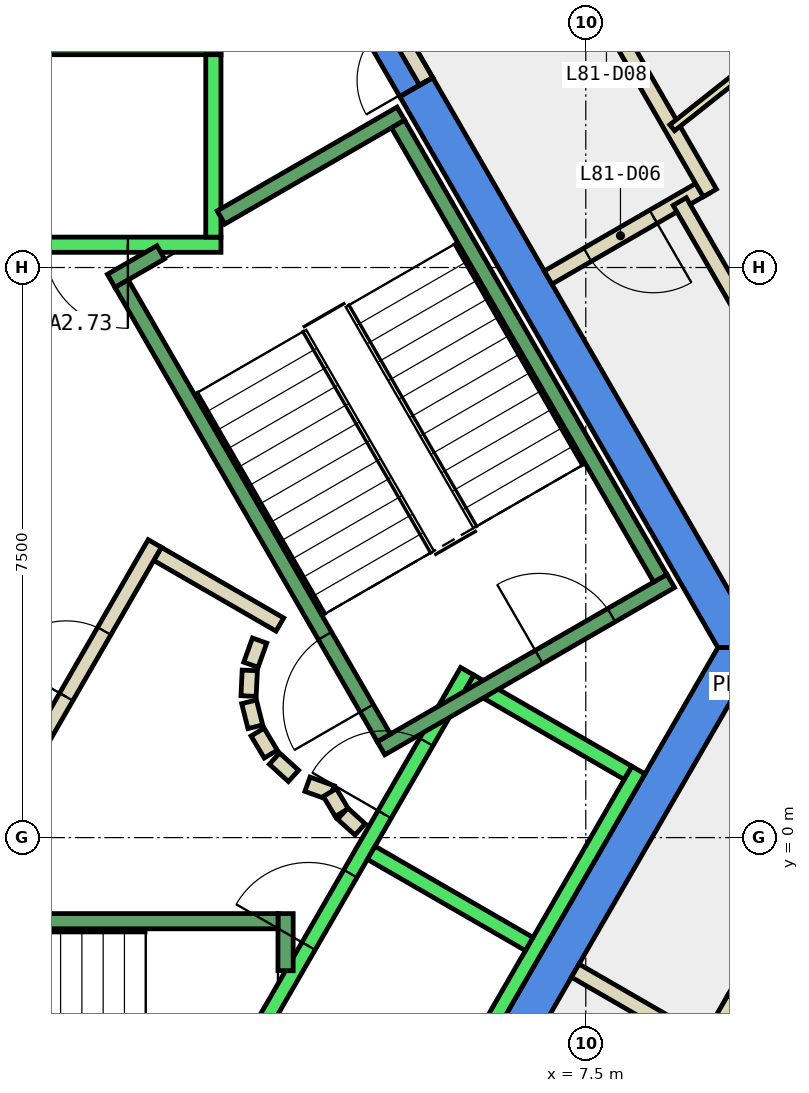
"""IFC4 building model, lengths in metres.
Left out: names, types, materials, properties, quantities, classifications, styles, units other than length and angle.
Written with IfcOpenShell. Run it as: python <this file> out.ifc"""

import sys

from ifc_helpers import new_model, si_unit, direction, frame, frame_2d, origin, place, context, subcontext, project, spatial, polyline, rectangle, outline, extrude, element, fill, save


model = new_model("IFC4")
c1 = context("Model", 3, precision=1e-05, world=origin(), true_north=direction((0.0, 1.0)))
c2 = subcontext(c1, "Body", "Model", "MODEL_VIEW")
j1 = project(units=[si_unit("LENGTHUNIT", "METRE"), si_unit("PLANEANGLEUNIT", "RADIAN")], contexts=[c1])
p1 = place(None, origin())
s1 = spatial("IfcSite", under=j1, at=p1, CompositionType="ELEMENT")
p2 = place(p1, origin())
s2 = spatial("IfcBuilding", under=s1, at=p2, CompositionType="ELEMENT")
p3 = place(p2, frame((0.0, 0.0, 344.9)))
s3 = spatial("IfcBuildingStorey", under=s2, at=p3, CompositionType="ELEMENT", Elevation=344.9)
p4 = place(p3, frame((0.0, 0.0, -0.35)))
e1 = element("IfcWall", 1, at=p4, inside=s3, PredefinedType="SHEAR", context=c2, shape_type="SweptSolid", body=[
    extrude(outline(polyline([(5.486, 9.998), (5.053, 9.748), (9.238, 2.5), (9.815, 2.5), (5.486, 9.998)])), origin(), (0.0, 0.0, 1.0), 4.4),
])
p5 = place(p3, frame((0.0, 0.0, 3.6)))
e2 = element("IfcWall", 2, at=p5, inside=s3, PredefinedType="SHEAR", context=c2, shape_type="SweptSolid", body=[
    extrude(outline(polyline([(5.022, 10.8), (4.677, 10.601), (4.619, 10.5), (5.053, 9.748), (5.486, 9.998), (5.022, 10.8)])), origin(), (0.0, 0.0, 1.0), 0.45),
])
p6 = place(p3, frame((0.0, 0.0, -0.35)))
e3 = element("IfcWall", 3, at=p6, inside=s3, PredefinedType="SHEAR", context=c2, shape_type="SweptSolid", body=[
    extrude(outline(polyline([(4.907, -6.0), (9.815, 2.5), (9.238, 2.5), (4.619, -5.5), (4.907, -6.0)])), origin(), (0.0, 0.0, 1.0), 4.4),
])
p7 = place(p3, frame((12.605, 7.854, 0.0), z_axis=(0.0, 0.0, 1.0), x_axis=(-0.510686403068, 0.859767060152, 0.0)))
e4 = element("IfcWall", 4, at=p7, inside=s3, PredefinedType="STANDARD", context=c2, shape_type="SweptSolid", body=[
    extrude(rectangle(XDim=6.38, YDim=0.3, at=frame_2d((3.19, 0.0))), origin(), (0.0, 0.0, 1.0), 4.05),
])
p8 = place(p7, frame((0.595, 0.0, 0.9)))
e5 = element("IfcOpeningElement", 5, at=p8, cuts=e4, PredefinedType="OPENING", context=c2, shape_type="SweptSolid", body=[
    extrude(rectangle(XDim=2.0, YDim=3.0, at=frame_2d((1.0, 1.5))), frame((0.0, 0.16, 0.0), z_axis=(0.0, -1.0, 0.0), x_axis=(1.0, 0.0, 0.0)), (0.0, 0.0, 1.0), 0.32),
])
p9 = place(p7, frame((3.785, 0.0, 0.9)))
e6 = element("IfcOpeningElement", 6, at=p9, cuts=e4, PredefinedType="OPENING", context=c2, shape_type="SweptSolid", body=[
    extrude(rectangle(XDim=2.0, YDim=3.0, at=frame_2d((1.0, 1.5))), frame((0.0, 0.16, 0.0), z_axis=(0.0, -1.0, 0.0), x_axis=(1.0, 0.0, 0.0)), (0.0, 0.0, 1.0), 0.32),
])
p10 = place(p3, frame((1.866, 3.732, 0.0), z_axis=(0.0, 0.0, 1.0), x_axis=(0.866043361281, -0.499968895414, 0.0)))
e7 = element("IfcWall", 7, at=p10, inside=s3, PredefinedType="PARTITIONING", context=c2, shape_type="SweptSolid", body=[
    extrude(rectangle(XDim=1.858, YDim=0.2, at=frame_2d((0.929, 0.0))), origin(), (0.0, 0.0, 1.0), 4.05),
])
p11 = place(p3, frame((3.208, 2.592, 0.0), z_axis=(0.0, 0.0, 1.0), x_axis=(-0.337388820924, -0.941365382578, 0.0)))
e8 = element("IfcWall", 8, at=p11, inside=s3, PredefinedType="PARTITIONING", context=c2, shape_type="SweptSolid", body=[
    extrude(rectangle(XDim=0.338, YDim=0.2, at=frame_2d((0.169, 0.0))), origin(), (0.0, 0.0, 1.0), 4.05),
])
p12 = place(p3, frame((3.079, 2.199, 0.0), z_axis=(0.0, 0.0, 1.0), x_axis=(-0.047771483479, -0.998858290933, 0.0)))
e9 = element("IfcWall", 9, at=p12, inside=s3, PredefinedType="PARTITIONING", context=c2, shape_type="SweptSolid", body=[
    extrude(rectangle(XDim=0.337, YDim=0.2, at=frame_2d((0.169, 0.0))), origin(), (0.0, 0.0, 1.0), 4.05),
])
p13 = place(p3, frame((3.07, 1.786, 0.0), z_axis=(0.0, 0.0, 1.0), x_axis=(0.242705583207, -0.970099994784, 0.0)))
e10 = element("IfcWall", 10, at=p13, inside=s3, PredefinedType="PARTITIONING", context=c2, shape_type="SweptSolid", body=[
    extrude(rectangle(XDim=0.338, YDim=0.2, at=frame_2d((0.169, 0.0))), origin(), (0.0, 0.0, 1.0), 4.05),
])
for number, where, z_axis, x_axis in (
    (11, (3.182, 1.388, 0.0), (0.0, 0.0, 1.0), (0.512, -0.859, 0.0)),
    (12, (3.404, 1.039, 0.0), (0.0, 0.0, 1.0), (0.74, -0.672, 0.0)),
):
    element("IfcWall", number, at=place(p3, frame(where, z_axis=z_axis, x_axis=x_axis)), inside=s3, PredefinedType="PARTITIONING", context=c2, shape_type="SweptSolid", body=[
        extrude(rectangle(XDim=0.338, YDim=0.2, at=frame_2d((0.169, 0.0))), origin(), (0.0, 0.0, 1.0), 4.05),
    ])
p14 = place(p3, frame((3.838, 0.702, 0.0), z_axis=(0.0, 0.0, 1.0), x_axis=(0.941035081519, -0.338308993895, 0.0)))
e13 = element("IfcWall", 13, at=p14, inside=s3, PredefinedType="PARTITIONING", context=c2, shape_type="SweptSolid", body=[
    extrude(rectangle(XDim=0.337, YDim=0.2, at=frame_2d((0.168, 0.0))), origin(), (0.0, 0.0, 1.0), 4.05),
])
p15 = place(p3, frame((4.132, 0.593, 0.0), z_axis=(0.0, 0.0, 1.0), x_axis=(0.513561617048, -0.858052717201, 0.0)))
e14 = element("IfcWall", 14, at=p15, inside=s3, PredefinedType="PARTITIONING", context=c2, shape_type="SweptSolid", body=[
    extrude(rectangle(XDim=0.308, YDim=0.2, at=frame_2d((0.154, 0.0))), origin(), (0.0, 0.0, 1.0), 4.05),
])
p16 = place(p3, frame((4.301, 0.315, 0.0), z_axis=(0.0, 0.0, 1.0), x_axis=(0.741798017506, -0.670623367639, 0.0)))
e15 = element("IfcWall", 15, at=p16, inside=s3, PredefinedType="PARTITIONING", context=c2, shape_type="SweptSolid", body=[
    extrude(rectangle(XDim=0.309, YDim=0.2, at=frame_2d((0.154, 0.0))), origin(), (0.0, 0.0, 1.0), 4.05),
])
p17 = place(p3, frame((0.05, 0.787, 0.0), z_axis=(0.0, 0.0, 1.0), x_axis=(0.499954076797, 0.866051915934, 0.0)))
e16 = element("IfcWall", 16, at=p17, inside=s3, PredefinedType="PARTITIONING", context=c2, shape_type="SweptSolid", body=[
    extrude(rectangle(XDim=3.558, YDim=0.2, at=frame_2d((1.779, 0.0))), origin(), (0.0, 0.0, 1.0), 4.05),
])
p18 = place(p17, frame((1.229, 0.0, 0.0)))
e17 = element("IfcOpeningElement", 17, at=p18, cuts=e16, PredefinedType="OPENING", context=c2, shape_type="SweptSolid", body=[
    extrude(rectangle(XDim=1.0, YDim=2.1, at=frame_2d((0.5, 1.05))), frame((0.0, 0.11, 0.0), z_axis=(0.0, -1.0, 0.0), x_axis=(1.0, 0.0, 0.0)), (0.0, 0.0, 1.0), 0.22),
])
p19 = place(p3, frame((7.361, -1.75, 0.0), z_axis=(0.0, 0.0, 1.0), x_axis=(0.865980106173, -0.500078449558, 0.0)))
e18 = element("IfcWall", 18, at=p19, inside=s3, PredefinedType="PARTITIONING", context=c2, shape_type="SweptSolid", body=[
    extrude(rectangle(XDim=1.9, YDim=0.2, at=frame_2d((0.95, 0.0))), origin(), (0.0, 0.0, 1.0), 4.05),
])
p20 = place(p3, frame((9.082, 8.568, 0.0), z_axis=(0.0, 0.0, 1.0), x_axis=(-0.865955154139, -0.50012165622, 0.0)))
e19 = element("IfcWall", 19, at=p20, inside=s3, PredefinedType="PARTITIONING", context=c2, shape_type="SweptSolid", body=[
    extrude(rectangle(XDim=2.4, YDim=0.2, at=frame_2d((1.2, 0.0))), origin(), (0.0, 0.0, 1.0), 4.05),
])
p21 = place(p20, frame((0.8, 0.0, 0.0)))
e20 = element("IfcOpeningElement", 20, at=p21, cuts=e19, PredefinedType="OPENING", context=c2, shape_type="SweptSolid", body=[
    extrude(rectangle(XDim=1.0, YDim=2.1, at=frame_2d((0.5, 1.05))), frame((0.0, 0.11, 0.0), z_axis=(0.0, -1.0, 0.0), x_axis=(1.0, 0.0, 0.0)), (0.0, 0.0, 1.0), 0.22),
])
p22 = place(p3, frame((8.736, 8.368, 0.0), z_axis=(0.0, 0.0, 1.0), x_axis=(0.500041339179, -0.866001535283, 0.0)))
e21 = element("IfcWall", 21, at=p22, inside=s3, PredefinedType="PARTITIONING", context=c2, shape_type="SweptSolid", body=[
    extrude(rectangle(XDim=2.342, YDim=0.2, at=frame_2d((1.171, 0.0))), origin(), (0.0, 0.0, 1.0), 4.05),
])
p23 = place(p3, frame((5.399, 9.948, 0.0), z_axis=(0.0, 0.0, 1.0), x_axis=(-0.499882215713, 0.866093395895, 0.0)))
e22 = element("IfcWall", 22, at=p23, inside=s3, PredefinedType="PARTITIONING", context=c2, shape_type="SweptSolid", body=[
    extrude(rectangle(XDim=0.926, YDim=0.2, at=frame_2d((0.463, 0.0))), origin(), (0.0, 0.0, 1.0), 2.4),
])
p24 = place(p23, frame((0.017, 0.0, 0.0)))
e23 = element("IfcOpeningElement", 23, at=p24, cuts=e22, PredefinedType="OPENING", context=c2, shape_type="SweptSolid", body=[
    extrude(rectangle(XDim=0.9, YDim=2.1, at=frame_2d((0.45, 1.05))), frame((0.0, 0.11, 0.0), z_axis=(0.0, -1.0, 0.0), x_axis=(1.0, 0.0, 0.0)), (0.0, 0.0, 1.0), 0.22),
])
p25 = place(p3, frame((7.482, 11.339, 0.0), z_axis=(0.0, 0.0, 1.0), x_axis=(0.49999780286, -0.8660266723, 0.0)))
e24 = element("IfcWall", 24, at=p25, inside=s3, PredefinedType="PARTITIONING", context=c2, shape_type="SweptSolid", body=[
    extrude(rectangle(XDim=3.3, YDim=0.2, at=frame_2d((1.65, 0.0))), origin(), (0.0, 0.0, 1.0), 4.05),
])
p26 = place(p25, frame((0.08, 0.0, 0.0)))
e25 = element("IfcOpeningElement", 25, at=p26, cuts=e24, PredefinedType="OPENING", context=c2, shape_type="SweptSolid", body=[
    extrude(rectangle(XDim=1.0, YDim=2.1, at=frame_2d((0.5, 1.05))), frame((0.0, 0.11, 0.0), z_axis=(0.0, -1.0, 0.0), x_axis=(1.0, 0.0, 0.0)), (0.0, 0.0, 1.0), 0.22),
])
p27 = place(p3, frame((9.815, -1.499, 0.0), z_axis=(0.0, 0.0, 1.0), x_axis=(-0.499508606083, -0.866308924373, 0.0)))
e26 = element("IfcWall", 26, at=p27, inside=s3, PredefinedType="PARTITIONING", context=c2, shape_type="SweptSolid", body=[
    extrude(rectangle(XDim=0.725, YDim=0.2, at=frame_2d((0.362, 0.0))), origin(), (0.0, 0.0, 1.0), 1.95),
])
p28 = place(p3, frame((9.453, -2.127, 0.0), z_axis=(0.0, 0.0, 1.0), x_axis=(-0.499884866553, -0.866091865907, 0.0)))
e27 = element("IfcWall", 27, at=p28, inside=s3, PredefinedType="PARTITIONING", context=c2, shape_type="SweptSolid", body=[
    extrude(rectangle(XDim=0.694, YDim=0.2, at=frame_2d((0.347, 0.0))), origin(), (0.0, 0.0, 1.0), 4.05),
])
p29 = place(p3, frame((9.821, 10.276, 0.0), z_axis=(0.0, 0.0, 1.0), x_axis=(-0.784249073328, -0.620446122548, 0.0)))
e28 = element("IfcWall", 28, at=p29, inside=s3, PredefinedType="PARTITIONING", context=c2, shape_type="SweptSolid", body=[
    extrude(rectangle(XDim=1.51, YDim=0.1, at=frame_2d((0.755, 0.0))), origin(), (0.0, 0.0, 1.0), 4.05),
])
p30 = place(p3, frame((2.7, 7.8, 0.0), z_axis=(0.0, 0.0, 1.0), x_axis=(-1.0, 0.0, 0.0)))
e29 = element("IfcWall", 29, at=p30, inside=s3, PredefinedType="STANDARD", context=c2, shape_type="SweptSolid", body=[
    extrude(rectangle(XDim=5.4, YDim=0.2, at=frame_2d((2.7, 0.0))), origin(), (0.0, 0.0, 1.0), 4.05),
])
p31 = place(p30, frame((1.225, 0.0, 0.0)))
e30 = element("IfcOpeningElement", 30, at=p31, cuts=e29, PredefinedType="OPENING", context=c2, shape_type="SweptSolid", body=[
    extrude(rectangle(XDim=1.1, YDim=2.1, at=frame_2d((0.55, 1.05))), frame((0.0, 0.11, 0.0), z_axis=(0.0, -1.0, 0.0), x_axis=(1.0, 0.0, 0.0)), (0.0, 0.0, 1.0), 0.22),
])
p32 = place(p30, frame((3.075, 0.0, 0.0)))
e31 = element("IfcOpeningElement", 31, at=p32, cuts=e29, PredefinedType="OPENING", context=c2, shape_type="SweptSolid", body=[
    extrude(rectangle(XDim=1.1, YDim=2.1, at=frame_2d((0.55, 1.05))), frame((0.0, 0.11, 0.0), z_axis=(0.0, -1.0, 0.0), x_axis=(1.0, 0.0, 0.0)), (0.0, 0.0, 1.0), 0.22),
])
p33 = place(p3, frame((2.7, 10.4, 0.0), z_axis=(0.0, 0.0, 1.0), x_axis=(-1.0, 0.0, 0.0)))
e32 = element("IfcWall", 32, at=p33, inside=s3, PredefinedType="STANDARD", context=c2, shape_type="SweptSolid", body=[
    extrude(rectangle(XDim=5.4, YDim=0.2, at=frame_2d((2.7, 0.0))), origin(), (0.0, 0.0, 1.0), 4.05),
])
p34 = place(p3, frame((2.6, 7.9, 0.0), z_axis=(0.0, 0.0, 1.0), x_axis=(0.0, 1.0, 0.0)))
e33 = element("IfcWall", 33, at=p34, inside=s3, PredefinedType="STANDARD", context=c2, shape_type="SweptSolid", body=[
    extrude(rectangle(XDim=2.4, YDim=0.2, at=frame_2d((1.2, 0.0))), origin(), (0.0, 0.0, 1.0), 4.05),
])
p35 = place(p3, frame((3.24, -2.488, 0.0), z_axis=(0.0, 0.0, 1.0), x_axis=(0.500034260056, 0.866005622828, 0.0)))
e34 = element("IfcWall", 34, at=p35, inside=s3, PredefinedType="STANDARD", context=c2, shape_type="SweptSolid", body=[
    extrude(rectangle(XDim=5.399, YDim=0.2, at=frame_2d((2.7, 0.0))), origin(), (0.0, 0.0, 1.0), 4.05),
])
p36 = place(p35, frame((3.225, 0.0, 0.0)))
e35 = element("IfcOpeningElement", 35, at=p36, cuts=e34, PredefinedType="OPENING", context=c2, shape_type="SweptSolid", body=[
    extrude(rectangle(XDim=1.1, YDim=2.1, at=frame_2d((0.55, 1.05))), frame((0.0, 0.11, 0.0), z_axis=(0.0, -1.0, 0.0), x_axis=(1.0, 0.0, 0.0)), (0.0, 0.0, 1.0), 0.22),
])
p37 = place(p35, frame((1.225, 0.0, 0.0)))
e36 = element("IfcOpeningElement", 36, at=p37, cuts=e34, PredefinedType="OPENING", context=c2, shape_type="SweptSolid", body=[
    extrude(rectangle(XDim=1.1, YDim=2.1, at=frame_2d((0.55, 1.05))), frame((0.0, 0.11, 0.0), z_axis=(0.0, -1.0, 0.0), x_axis=(1.0, 0.0, 0.0)), (0.0, 0.0, 1.0), 0.22),
])
p38 = place(p3, frame((5.492, -3.788, 0.0), z_axis=(0.0, 0.0, 1.0), x_axis=(0.500034260056, 0.866005622828, 0.0)))
e37 = element("IfcWall", 37, at=p38, inside=s3, PredefinedType="STANDARD", context=c2, shape_type="SweptSolid", body=[
    extrude(rectangle(XDim=5.399, YDim=0.2, at=frame_2d((2.7, 0.0))), origin(), (0.0, 0.0, 1.0), 4.05),
])
for number, where, z_axis, x_axis in (
    (38, (4.677, -0.2, 0.0), (0.0, 0.0, 1.0), (0.866, -0.5, 0.0)),
    (39, (5.977, 2.052, 0.0), (0.0, 0.0, 1.0), (0.866, -0.5, 0.0)),
):
    element("IfcWall", number, at=place(p3, frame(where, z_axis=z_axis, x_axis=x_axis)), inside=s3, PredefinedType="STANDARD", context=c2, shape_type="SweptSolid", body=[
        extrude(rectangle(XDim=2.399, YDim=0.2, at=frame_2d((1.2, 0.0))), origin(), (0.0, 0.0, 1.0), 4.05),
    ])
p39 = place(p3, frame((3.55, -1.0, 0.0), z_axis=(0.0, 0.0, 1.0), x_axis=(0.0, -1.0, 0.0)))
e40 = element("IfcWall", 40, at=p39, inside=s3, PredefinedType="STANDARD", context=c2, shape_type="SweptSolid", body=[
    extrude(rectangle(XDim=0.751, YDim=0.2, at=frame_2d((0.375, 0.0))), origin(), (0.0, 0.0, 1.0), 4.05),
])
p40 = place(p3, frame((-3.45, -1.1, 0.0), z_axis=(0.0, 0.0, 1.0), x_axis=(1.0, 0.0, 0.0)))
e41 = element("IfcWall", 41, at=p40, inside=s3, PredefinedType="STANDARD", context=c2, shape_type="SweptSolid", body=[
    extrude(rectangle(XDim=6.9, YDim=0.2, at=frame_2d((3.45, 0.0))), origin(), (0.0, 0.0, 1.0), 4.05),
])
p41 = place(p40, frame((0.45, 0.0, 0.0)))
e42 = element("IfcOpeningElement", 42, at=p41, cuts=e41, PredefinedType="OPENING", context=c2, shape_type="SweptSolid", body=[
    extrude(rectangle(XDim=1.1, YDim=2.2, at=frame_2d((0.55, 1.1))), frame((0.0, 0.11, 0.0), z_axis=(0.0, -1.0, 0.0), x_axis=(1.0, 0.0, 0.0)), (0.0, 0.0, 1.0), 0.22),
])
p42 = place(p3, frame((4.806, 1.176, 0.0), z_axis=(0.0, 0.0, 1.0), x_axis=(0.866059941101, 0.499940174841, 0.0)))
e43 = element("IfcWall", 43, at=p42, inside=s3, PredefinedType="STANDARD", context=c2, shape_type="SweptSolid", body=[
    extrude(rectangle(XDim=4.4, YDim=0.2, at=frame_2d((2.2, 0.0))), origin(), (0.0, 0.0, 1.0), 4.05),
])
p43 = place(p42, frame((2.4, 0.0, 0.0)))
e44 = element("IfcOpeningElement", 44, at=p43, cuts=e43, PredefinedType="OPENING", context=c2, shape_type="SweptSolid", body=[
    extrude(rectangle(XDim=1.1, YDim=2.2, at=frame_2d((0.55, 1.1))), frame((0.0, 0.11, 0.0), z_axis=(0.0, -1.0, 0.0), x_axis=(1.0, 0.0, 0.0)), (0.0, 0.0, 1.0), 0.22),
])
p44 = place(p3, frame((2.7, 8.158, 0.0), z_axis=(0.0, 0.0, 1.0), x_axis=(0.86611865017, 0.499838457731, 0.0)))
e45 = element("IfcWall", 45, at=p44, inside=s3, PredefinedType="STANDARD", context=c2, shape_type="SweptSolid", body=[
    extrude(rectangle(XDim=2.733, YDim=0.2, at=frame_2d((1.366, 0.0))), origin(), (0.0, 0.0, 1.0), 4.05),
])
p45 = place(p3, frame((1.256, 7.324, 0.0), z_axis=(0.0, 0.0, 1.0), x_axis=(0.865915093549, 0.500191014278, 0.0)))
e46 = element("IfcWall", 46, at=p45, inside=s3, PredefinedType="STANDARD", context=c2, shape_type="SweptSolid", body=[
    extrude(rectangle(XDim=0.752, YDim=0.2, at=frame_2d((0.376, 0.0))), origin(), (0.0, 0.0, 1.0), 4.05),
])
p46 = place(p3, frame((4.843, 1.312, 0.0), z_axis=(0.0, 0.0, 1.0), x_axis=(-0.499963383562, 0.866046543262, 0.0)))
e47 = element("IfcWall", 47, at=p46, inside=s3, PredefinedType="STANDARD", context=c2, shape_type="SweptSolid", body=[
    extrude(rectangle(XDim=6.9, YDim=0.2, at=frame_2d((3.45, 0.0))), origin(), (0.0, 0.0, 1.0), 4.05),
])
p47 = place(p46, frame((0.45, 0.0, 0.0)))
e48 = element("IfcOpeningElement", 48, at=p47, cuts=e47, PredefinedType="OPENING", context=c2, shape_type="SweptSolid", body=[
    extrude(rectangle(XDim=1.1, YDim=2.2, at=frame_2d((0.55, 1.1))), frame((0.0, 0.11, 0.0), z_axis=(0.0, -1.0, 0.0), x_axis=(1.0, 0.0, 0.0)), (0.0, 0.0, 1.0), 0.22),
])
p48 = place(p3, frame((8.48, 3.412, 0.0), z_axis=(0.0, 0.0, 1.0), x_axis=(-0.499978703459, 0.866037698999, 0.0)))
e49 = element("IfcWall", 49, at=p48, inside=s3, PredefinedType="STANDARD", context=c2, shape_type="SweptSolid", body=[
    extrude(rectangle(XDim=6.9, YDim=0.2, at=frame_2d((3.45, 0.0))), origin(), (0.0, 0.0, 1.0), 4.05),
])
p49 = place(p21, origin())
e50 = element("IfcDoor", 50, at=p49, inside=s3, OperationType="SINGLE_SWING_LEFT", PredefinedType="DOOR", context=c2, shape_type="SweptSolid", body=[
    extrude(rectangle(XDim=1.0, YDim=2.1, at=frame_2d((0.5, 1.05))), frame((0.0, 0.025, 0.0), z_axis=(0.0, -1.0, 0.0), x_axis=(1.0, 0.0, 0.0)), (0.0, 0.0, 1.0), 0.05),
])
fill(e20, e50)
p50 = place(p18, origin())
e51 = element("IfcDoor", 51, at=p50, inside=s3, OperationType="SINGLE_SWING_RIGHT", PredefinedType="DOOR", context=c2, shape_type="SweptSolid", body=[
    extrude(rectangle(XDim=1.0, YDim=2.1, at=frame_2d((0.5, 1.05))), frame((0.0, 0.025, 0.0), z_axis=(0.0, -1.0, 0.0), x_axis=(1.0, 0.0, 0.0)), (0.0, 0.0, 1.0), 0.05),
])
fill(e17, e51)
p51 = place(p24, origin())
e52 = element("IfcDoor", 52, at=p51, inside=s3, OperationType="SINGLE_SWING_LEFT", PredefinedType="DOOR", context=c2, shape_type="SweptSolid", body=[
    extrude(rectangle(XDim=0.9, YDim=2.1, at=frame_2d((0.45, 1.05))), frame((0.0, 0.025, 0.0), z_axis=(0.0, -1.0, 0.0), x_axis=(1.0, 0.0, 0.0)), (0.0, 0.0, 1.0), 0.05),
])
fill(e23, e52)
p52 = place(p31, origin())
e53 = element("IfcDoor", 53, at=p52, inside=s3, OperationType="SLIDING_TO_LEFT", PredefinedType="DOOR", context=c2, shape_type="SweptSolid", body=[
    extrude(rectangle(XDim=1.1, YDim=2.1, at=frame_2d((0.55, 1.05))), frame((0.0, 0.025, 0.0), z_axis=(0.0, -1.0, 0.0), x_axis=(1.0, 0.0, 0.0)), (0.0, 0.0, 1.0), 0.05),
])
fill(e30, e53)
p53 = place(p36, origin())
e54 = element("IfcDoor", 54, at=p53, inside=s3, OperationType="SLIDING_TO_LEFT", PredefinedType="DOOR", context=c2, shape_type="SweptSolid", body=[
    extrude(rectangle(XDim=1.1, YDim=2.1, at=frame_2d((0.55, 1.05))), frame((0.0, 0.025, 0.0), z_axis=(0.0, -1.0, 0.0), x_axis=(1.0, 0.0, 0.0)), (0.0, 0.0, 1.0), 0.05),
])
fill(e35, e54)
p54 = place(p37, origin())
e55 = element("IfcDoor", 55, at=p54, inside=s3, OperationType="SLIDING_TO_LEFT", PredefinedType="DOOR", context=c2, shape_type="SweptSolid", body=[
    extrude(rectangle(XDim=1.1, YDim=2.1, at=frame_2d((0.55, 1.05))), frame((0.0, 0.025, 0.0), z_axis=(0.0, -1.0, 0.0), x_axis=(1.0, 0.0, 0.0)), (0.0, 0.0, 1.0), 0.05),
])
fill(e36, e55)
p55 = place(p47, origin())
e56 = element("IfcDoor", 56, at=p55, inside=s3, OperationType="SINGLE_SWING_LEFT", PredefinedType="DOOR", context=c2, shape_type="SweptSolid", body=[
    extrude(rectangle(XDim=1.1, YDim=2.2, at=frame_2d((0.55, 1.1))), frame((0.0, 0.025, 0.0), z_axis=(0.0, -1.0, 0.0), x_axis=(1.0, 0.0, 0.0)), (0.0, 0.0, 1.0), 0.05),
])
fill(e48, e56)
p56 = place(p43, origin())
e57 = element("IfcDoor", 57, at=p56, inside=s3, OperationType="SINGLE_SWING_LEFT", PredefinedType="DOOR", context=c2, shape_type="SweptSolid", body=[
    extrude(rectangle(XDim=1.1, YDim=2.2, at=frame_2d((0.55, 1.1))), frame((0.0, 0.025, 0.0), z_axis=(0.0, -1.0, 0.0), x_axis=(1.0, 0.0, 0.0)), (0.0, 0.0, 1.0), 0.05),
])
fill(e44, e57)
save(model, sys.argv[1])
